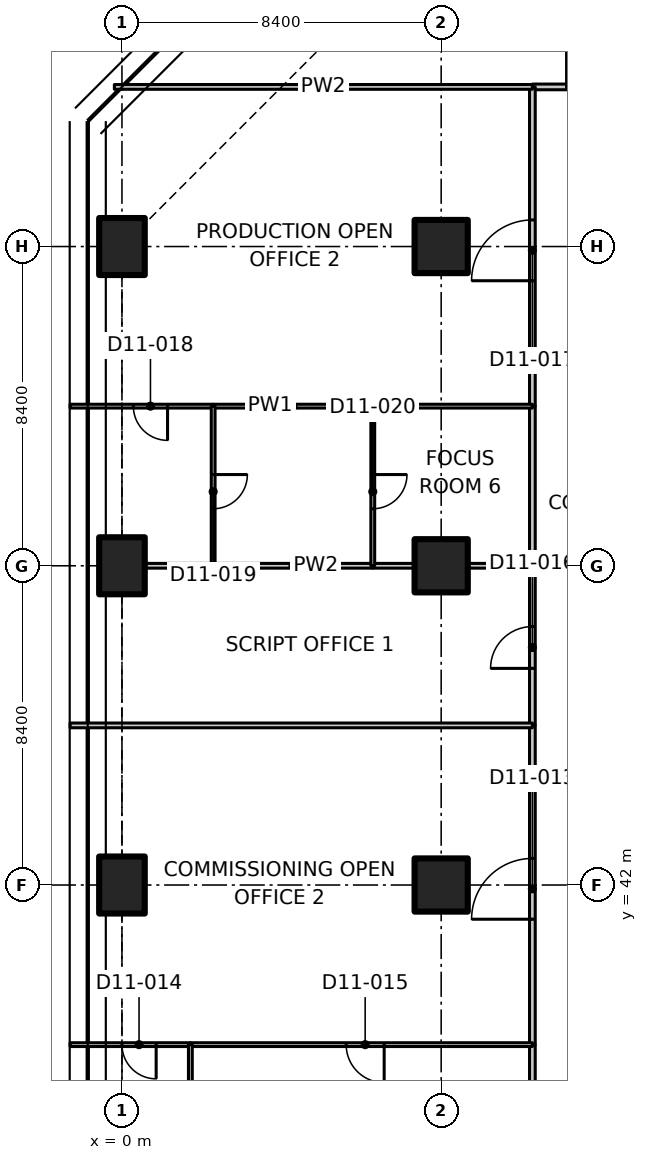
"""IFC4 building model, lengths in metres.
Left out: names, types, materials, properties, quantities, classifications, styles, units other than length and angle.
Written with IfcOpenShell. Run it as: python <this file> out.ifc"""

import sys

from ifc_helpers import new_model, si_unit, direction, frame, frame_2d, origin, origin_2d, place, context, subcontext, project, spatial, polyline, rectangle, outline, extrude, element, fill, save


model = new_model("IFC4")
c1 = context("Model", 3, precision=1e-05, world=origin(), true_north=direction((0.0, 1.0)))
c2 = subcontext(c1, "Body", "Model", "MODEL_VIEW")
j1 = project(units=[si_unit("LENGTHUNIT", "METRE"), si_unit("PLANEANGLEUNIT", "RADIAN")], contexts=[c1])
p1 = place(None, origin())
s1 = spatial("IfcSite", under=j1, at=p1, CompositionType="ELEMENT")
p2 = place(p1, origin())
s2 = spatial("IfcBuilding", under=s1, at=p2, CompositionType="ELEMENT")
p3 = place(p2, frame((0.0, 0.0, 83.3)))
s3 = spatial("IfcBuildingStorey", under=s2, at=p3, CompositionType="ELEMENT", Elevation=83.3)
for number, where, z_axis, x_axis in (
    (1, (0.0, 42.0, 0.0), (0.0, 0.0, 1.0), (1.0, 0.0, 0.0)),
    (2, (0.0, 50.4, 0.0), (0.0, 0.0, 1.0), (1.0, 0.0, 0.0)),
    (3, (0.0, 58.8, 0.0), (0.0, 0.0, 1.0), (1.0, 0.0, 0.0)),
):
    element("IfcColumn", number, at=place(p3, frame(where, z_axis=z_axis, x_axis=x_axis)), inside=s3, PredefinedType="COLUMN", context=c2, shape_type="SweptSolid", body=[
        extrude(rectangle(XDim=1.2, YDim=1.5, at=origin_2d()), origin(), (0.0, 0.0, 1.0), 3.3),
    ])
for number, where, z_axis, x_axis in (
    (4, (8.4, 42.0, 0.0), (0.0, 0.0, 1.0), (1.0, 0.0, 0.0)),
    (5, (8.4, 50.4, 0.0), (0.0, 0.0, 1.0), (1.0, 0.0, 0.0)),
    (6, (8.4, 58.8, 0.0), (0.0, 0.0, 1.0), (1.0, 0.0, 0.0)),
):
    element("IfcColumn", number, at=place(p3, frame(where, z_axis=z_axis, x_axis=x_axis)), inside=s3, PredefinedType="COLUMN", context=c2, shape_type="SweptSolid", body=[
        extrude(rectangle(XDim=1.4, YDim=1.4, at=origin_2d()), origin(), (0.0, 0.0, 1.0), 3.3),
    ])
p4 = place(p3, frame((10.8, 63.0, 0.0), z_axis=(0.0, 0.0, 1.0), x_axis=(1.0, 0.0, 0.0)))
e7 = element("IfcWall", 7, at=p4, inside=s3, PredefinedType="PARTITIONING", context=c2, shape_type="SweptSolid", body=[
    extrude(rectangle(XDim=3.6, YDim=0.15, at=frame_2d((1.8, 0.0))), origin(), (0.0, 0.0, 1.0), 3.28),
])
p5 = place(p4, frame((0.9, 0.0, 0.0)))
e8 = element("IfcOpeningElement", 8, at=p5, cuts=e7, PredefinedType="OPENING", context=c2, shape_type="SweptSolid", body=[
    extrude(rectangle(XDim=2.0, YDim=2.4, at=frame_2d((1.0, 1.2))), frame((0.0, 0.085, 0.0), z_axis=(0.0, -1.0, 0.0), x_axis=(1.0, 0.0, 0.0)), (0.0, 0.0, 1.0), 0.17),
])
p6 = place(p3, frame((10.8, 37.8, 0.0), z_axis=(0.0, 0.0, 1.0), x_axis=(0.0, 1.0, 0.0)))
e9 = element("IfcWall", 9, at=p6, inside=s3, PredefinedType="PARTITIONING", context=c2, shape_type="SweptSolid", body=[
    extrude(rectangle(XDim=8.4, YDim=0.15, at=frame_2d((4.2, 0.0))), origin(), (0.0, 0.0, 1.0), 3.28),
])
p7 = place(p6, frame((3.3, 0.0, 0.0)))
e10 = element("IfcOpeningElement", 10, at=p7, cuts=e9, PredefinedType="OPENING", context=c2, shape_type="SweptSolid", body=[
    extrude(rectangle(XDim=1.6, YDim=2.1, at=frame_2d((0.8, 1.05))), frame((0.0, 0.085, 0.0), z_axis=(0.0, -1.0, 0.0), x_axis=(1.0, 0.0, 0.0)), (0.0, 0.0, 1.0), 0.17),
])
p8 = place(p3, frame((10.8, 33.6, 0.0), z_axis=(0.0, 0.0, 1.0), x_axis=(0.0, 1.0, 0.0)))
e11 = element("IfcWall", 11, at=p8, inside=s3, PredefinedType="PARTITIONING", context=c2, shape_type="SweptSolid", body=[
    extrude(rectangle(XDim=4.2, YDim=0.15, at=frame_2d((2.1, 0.0))), origin(), (0.0, 0.0, 1.0), 3.28),
])
p9 = place(p3, frame((10.8, 46.2, 0.0), z_axis=(0.0, 0.0, 1.0), x_axis=(0.0, 1.0, 0.0)))
e12 = element("IfcWall", 12, at=p9, inside=s3, PredefinedType="PARTITIONING", context=c2, shape_type="SweptSolid", body=[
    extrude(rectangle(XDim=4.2, YDim=0.15, at=frame_2d((2.1, 0.0))), origin(), (0.0, 0.0, 1.0), 3.28),
])
p10 = place(p9, frame((1.5, 0.0, 0.0)))
e13 = element("IfcOpeningElement", 13, at=p10, cuts=e12, PredefinedType="OPENING", context=c2, shape_type="SweptSolid", body=[
    extrude(rectangle(XDim=1.1, YDim=2.1, at=frame_2d((0.55, 1.05))), frame((0.0, 0.085, 0.0), z_axis=(0.0, -1.0, 0.0), x_axis=(1.0, 0.0, 0.0)), (0.0, 0.0, 1.0), 0.17),
])
p11 = place(p3, frame((10.8, 54.6, 0.0), z_axis=(0.0, 0.0, 1.0), x_axis=(0.0, 1.0, 0.0)))
e14 = element("IfcWall", 14, at=p11, inside=s3, PredefinedType="PARTITIONING", context=c2, shape_type="SweptSolid", body=[
    extrude(rectangle(XDim=8.4, YDim=0.15, at=frame_2d((4.2, 0.0))), origin(), (0.0, 0.0, 1.0), 3.28),
])
p12 = place(p11, frame((3.3, 0.0, 0.0)))
e15 = element("IfcOpeningElement", 15, at=p12, cuts=e14, PredefinedType="OPENING", context=c2, shape_type="SweptSolid", body=[
    extrude(rectangle(XDim=1.6, YDim=2.1, at=frame_2d((0.8, 1.05))), frame((0.0, 0.085, 0.0), z_axis=(0.0, -1.0, 0.0), x_axis=(1.0, 0.0, 0.0)), (0.0, 0.0, 1.0), 0.17),
])
p13 = place(p3, frame((10.8, 50.4, 0.0), z_axis=(0.0, 0.0, 1.0), x_axis=(0.0, 1.0, 0.0)))
e16 = element("IfcWall", 16, at=p13, inside=s3, PredefinedType="PARTITIONING", context=c2, shape_type="SweptSolid", body=[
    extrude(rectangle(XDim=4.2, YDim=0.15, at=frame_2d((2.1, 0.0))), origin(), (0.0, 0.0, 1.0), 3.28),
])
p14 = place(p3, frame((10.8, 63.0, 0.0), z_axis=(0.0, 0.0, 1.0), x_axis=(-1.0, 0.0, 0.0)))
e17 = element("IfcWall", 17, at=p14, inside=s3, PredefinedType="PARTITIONING", context=c2, shape_type="SweptSolid", body=[
    extrude(outline(polyline([(0.0, 0.0), (11.0, 0.0), (11.0, 3.28), (7.278, 3.28), (7.276, 2.93), (5.924, 2.93), (5.922, 3.28), (0.0, 3.28), (0.0, 0.0)])), frame((0.0, 0.062, 0.0), z_axis=(0.0, -1.0, 0.0), x_axis=(1.0, 0.0, 0.0)), (0.0, 0.0, 1.0), 0.125),
])
p15 = place(p3, frame((1.8, 37.8, 0.0), z_axis=(0.0, 0.0, 1.0), x_axis=(-1.0, 0.0, 0.0)))
e18 = element("IfcWall", 18, at=p15, inside=s3, PredefinedType="PARTITIONING", context=c2, shape_type="SweptSolid", body=[
    extrude(rectangle(XDim=3.165, YDim=0.1, at=frame_2d((1.583, 0.0))), origin(), (0.0, 0.0, 1.0), 2.93),
])
p16 = place(p15, frame((0.9, 0.0, 0.0)))
e19 = element("IfcOpeningElement", 19, at=p16, cuts=e18, PredefinedType="OPENING", context=c2, shape_type="SweptSolid", body=[
    extrude(rectangle(XDim=0.9, YDim=2.1, at=frame_2d((0.45, 1.05))), frame((0.0, 0.06, 0.0), z_axis=(0.0, -1.0, 0.0), x_axis=(1.0, 0.0, 0.0)), (0.0, 0.0, 1.0), 0.12),
])
p17 = place(p3, frame((10.8, 37.8, 0.0), z_axis=(0.0, 0.0, 1.0), x_axis=(-1.0, 0.0, 0.0)))
e20 = element("IfcWall", 20, at=p17, inside=s3, PredefinedType="PARTITIONING", context=c2, shape_type="SweptSolid", body=[
    extrude(rectangle(XDim=9.0, YDim=0.1, at=frame_2d((4.5, 0.0))), origin(), (0.0, 0.0, 1.0), 3.28),
])
p18 = place(p17, frame((3.9, 0.0, 0.0)))
e21 = element("IfcOpeningElement", 21, at=p18, cuts=e20, PredefinedType="OPENING", context=c2, shape_type="SweptSolid", body=[
    extrude(rectangle(XDim=1.0, YDim=2.1, at=frame_2d((0.5, 1.05))), frame((0.0, 0.06, 0.0), z_axis=(0.0, -1.0, 0.0), x_axis=(1.0, 0.0, 0.0)), (0.0, 0.0, 1.0), 0.12),
])
p19 = place(p3, frame((-1.365, 46.2, 0.0), z_axis=(0.0, 0.0, 1.0), x_axis=(1.0, 0.0, 0.0)))
e22 = element("IfcWall", 22, at=p19, inside=s3, PredefinedType="PARTITIONING", context=c2, shape_type="SweptSolid", body=[
    extrude(outline(polyline([(0.0, 0.0), (12.165, 0.0), (12.165, 3.28), (1.815, 3.28), (1.813, 2.93), (0.917, 2.93), (0.915, 3.28), (0.265, 3.28), (0.0, 3.28), (0.0, 0.0)])), frame((0.0, 0.062, 0.0), z_axis=(0.0, -1.0, 0.0), x_axis=(1.0, 0.0, 0.0)), (0.0, 0.0, 1.0), 0.125),
])
p20 = place(p3, frame((1.8, 37.8, 0.0), z_axis=(0.0, 0.0, 1.0), x_axis=(0.0, -1.0, 0.0)))
e23 = element("IfcWall", 23, at=p20, inside=s3, PredefinedType="PARTITIONING", context=c2, shape_type="SweptSolid", body=[
    extrude(rectangle(XDim=4.2, YDim=0.1, at=frame_2d((2.1, 0.0))), origin(), (0.0, 0.0, 1.0), 3.28),
])
p21 = place(p3, frame((0.62, 50.4, 0.0), z_axis=(0.0, 0.0, 1.0), x_axis=(1.0, 0.0, 0.0)))
e24 = element("IfcWall", 24, at=p21, inside=s3, PredefinedType="PARTITIONING", context=c2, shape_type="SweptSolid", body=[
    extrude(rectangle(XDim=1.78, YDim=0.125, at=frame_2d((0.89, 0.0))), origin(), (0.0, 0.0, 1.0), 3.28),
])
p22 = place(p3, frame((2.4, 50.4, 0.0), z_axis=(0.0, 0.0, 1.0), x_axis=(1.0, 0.0, 0.0)))
e25 = element("IfcWall", 25, at=p22, inside=s3, PredefinedType="PARTITIONING", context=c2, shape_type="SweptSolid", body=[
    extrude(rectangle(XDim=4.2, YDim=0.125, at=frame_2d((2.1, 0.0))), origin(), (0.0, 0.0, 1.0), 3.28),
])
p23 = place(p3, frame((6.6, 50.4, 0.0), z_axis=(0.0, 0.0, 1.0), x_axis=(1.0, 0.0, 0.0)))
e26 = element("IfcWall", 26, at=p23, inside=s3, PredefinedType="PARTITIONING", context=c2, shape_type="SweptSolid", body=[
    extrude(rectangle(XDim=1.08, YDim=0.125, at=frame_2d((0.54, 0.0))), origin(), (0.0, 0.0, 1.0), 3.28),
])
p24 = place(p3, frame((9.12, 50.4, 0.0), z_axis=(0.0, 0.0, 1.0), x_axis=(1.0, 0.0, 0.0)))
e27 = element("IfcWall", 27, at=p24, inside=s3, PredefinedType="PARTITIONING", context=c2, shape_type="SweptSolid", body=[
    extrude(rectangle(XDim=1.68, YDim=0.125, at=frame_2d((0.84, 0.0))), origin(), (0.0, 0.0, 1.0), 3.28),
])
p25 = place(p3, frame((2.4, 54.6, 0.0), z_axis=(0.0, 0.0, 1.0), x_axis=(-1.0, 0.0, 0.0)))
e28 = element("IfcWall", 28, at=p25, inside=s3, PredefinedType="PARTITIONING", context=c2, shape_type="SweptSolid", body=[
    extrude(rectangle(XDim=3.765, YDim=0.1, at=frame_2d((1.882, 0.0))), origin(), (0.0, 0.0, 1.0), 2.93),
])
p26 = place(p25, frame((1.2, 0.0, 0.0)))
e29 = element("IfcOpeningElement", 29, at=p26, cuts=e28, PredefinedType="OPENING", context=c2, shape_type="SweptSolid", body=[
    extrude(rectangle(XDim=0.9, YDim=2.1, at=frame_2d((0.45, 1.05))), frame((0.0, 0.06, 0.0), z_axis=(0.0, -1.0, 0.0), x_axis=(1.0, 0.0, 0.0)), (0.0, 0.0, 1.0), 0.12),
])
p27 = place(p3, frame((6.6, 54.6, 0.0), z_axis=(0.0, 0.0, 1.0), x_axis=(-1.0, 0.0, 0.0)))
e30 = element("IfcWall", 30, at=p27, inside=s3, PredefinedType="PARTITIONING", context=c2, shape_type="SweptSolid", body=[
    extrude(rectangle(XDim=4.2, YDim=0.1, at=frame_2d((2.1, 0.0))), origin(), (0.0, 0.0, 1.0), 3.28),
])
p28 = place(p3, frame((10.8, 54.6, 0.0), z_axis=(0.0, 0.0, 1.0), x_axis=(-1.0, 0.0, 0.0)))
e31 = element("IfcWall", 31, at=p28, inside=s3, PredefinedType="PARTITIONING", context=c2, shape_type="SweptSolid", body=[
    extrude(rectangle(XDim=4.2, YDim=0.1, at=frame_2d((2.1, 0.0))), origin(), (0.0, 0.0, 1.0), 3.28),
])
p29 = place(p3, frame((2.4, 54.6, 0.0), z_axis=(0.0, 0.0, 1.0), x_axis=(0.0, -1.0, 0.0)))
e32 = element("IfcWall", 32, at=p29, inside=s3, PredefinedType="PARTITIONING", context=c2, shape_type="SweptSolid", body=[
    extrude(rectangle(XDim=4.2, YDim=0.1, at=frame_2d((2.1, 0.0))), origin(), (0.0, 0.0, 1.0), 3.28),
])
p30 = place(p29, frame((1.8, 0.0, 0.0)))
e33 = element("IfcOpeningElement", 33, at=p30, cuts=e32, PredefinedType="OPENING", context=c2, shape_type="SweptSolid", body=[
    extrude(rectangle(XDim=0.9, YDim=2.1, at=frame_2d((0.45, 1.05))), frame((0.0, 0.06, 0.0), z_axis=(0.0, -1.0, 0.0), x_axis=(1.0, 0.0, 0.0)), (0.0, 0.0, 1.0), 0.12),
])
p31 = place(p3, frame((6.6, 54.6, 0.0), z_axis=(0.0, 0.0, 1.0), x_axis=(0.0, -1.0, 0.0)))
e34 = element("IfcWall", 34, at=p31, inside=s3, PredefinedType="PARTITIONING", context=c2, shape_type="SweptSolid", body=[
    extrude(rectangle(XDim=4.2, YDim=0.1, at=frame_2d((2.1, 0.0))), origin(), (0.0, 0.0, 1.0), 3.28),
])
p32 = place(p31, frame((1.8, 0.0, 0.0)))
e35 = element("IfcOpeningElement", 35, at=p32, cuts=e34, PredefinedType="OPENING", context=c2, shape_type="SweptSolid", body=[
    extrude(rectangle(XDim=0.9, YDim=2.1, at=frame_2d((0.45, 1.05))), frame((0.0, 0.06, 0.0), z_axis=(0.0, -1.0, 0.0), x_axis=(1.0, 0.0, 0.0)), (0.0, 0.0, 1.0), 0.12),
])
p33 = place(p5, origin())
e36 = element("IfcDoor", 36, at=p33, inside=s3, OperationType="DOUBLE_DOOR_SINGLE_SWING", PredefinedType="DOOR", context=c2, shape_type="SweptSolid", body=[
    extrude(rectangle(XDim=2.0, YDim=2.4, at=frame_2d((1.0, 1.2))), frame((0.0, 0.025, 0.0), z_axis=(0.0, -1.0, 0.0), x_axis=(1.0, 0.0, 0.0)), (0.0, 0.0, 1.0), 0.05),
])
fill(e8, e36)
p34 = place(p7, origin())
e37 = element("IfcDoor", 37, at=p34, inside=s3, OperationType="DOUBLE_DOOR_SINGLE_SWING", PredefinedType="DOOR", context=c2, shape_type="SweptSolid", body=[
    extrude(rectangle(XDim=1.6, YDim=2.1, at=frame_2d((0.8, 1.05))), frame((0.0, 0.025, 0.0), z_axis=(0.0, -1.0, 0.0), x_axis=(1.0, 0.0, 0.0)), (0.0, 0.0, 1.0), 0.05),
])
fill(e10, e37)
p35 = place(p16, origin())
e38 = element("IfcDoor", 38, at=p35, inside=s3, OperationType="SINGLE_SWING_LEFT", PredefinedType="DOOR", context=c2, shape_type="SweptSolid", body=[
    extrude(rectangle(XDim=0.9, YDim=2.1, at=frame_2d((0.45, 1.05))), frame((0.0, 0.025, 0.0), z_axis=(0.0, -1.0, 0.0), x_axis=(1.0, 0.0, 0.0)), (0.0, 0.0, 1.0), 0.05),
])
fill(e19, e38)
p36 = place(p18, origin())
e39 = element("IfcDoor", 39, at=p36, inside=s3, OperationType="SINGLE_SWING_LEFT", PredefinedType="DOOR", context=c2, shape_type="SweptSolid", body=[
    extrude(rectangle(XDim=1.0, YDim=2.1, at=frame_2d((0.5, 1.05))), frame((0.0, 0.025, 0.0), z_axis=(0.0, -1.0, 0.0), x_axis=(1.0, 0.0, 0.0)), (0.0, 0.0, 1.0), 0.05),
])
fill(e21, e39)
p37 = place(p10, origin())
e40 = element("IfcDoor", 40, at=p37, inside=s3, OperationType="SINGLE_SWING_LEFT", PredefinedType="DOOR", context=c2, shape_type="SweptSolid", body=[
    extrude(rectangle(XDim=1.1, YDim=2.1, at=frame_2d((0.55, 1.05))), frame((0.0, 0.025, 0.0), z_axis=(0.0, -1.0, 0.0), x_axis=(1.0, 0.0, 0.0)), (0.0, 0.0, 1.0), 0.05),
])
fill(e13, e40)
p38 = place(p12, origin())
e41 = element("IfcDoor", 41, at=p38, inside=s3, OperationType="DOUBLE_DOOR_SINGLE_SWING", PredefinedType="DOOR", context=c2, shape_type="SweptSolid", body=[
    extrude(rectangle(XDim=1.6, YDim=2.1, at=frame_2d((0.8, 1.05))), frame((0.0, 0.025, 0.0), z_axis=(0.0, -1.0, 0.0), x_axis=(1.0, 0.0, 0.0)), (0.0, 0.0, 1.0), 0.05),
])
fill(e15, e41)
p39 = place(p26, origin())
e42 = element("IfcDoor", 42, at=p39, inside=s3, OperationType="SINGLE_SWING_LEFT", PredefinedType="DOOR", context=c2, shape_type="SweptSolid", body=[
    extrude(rectangle(XDim=0.9, YDim=2.1, at=frame_2d((0.45, 1.05))), frame((0.0, 0.025, 0.0), z_axis=(0.0, -1.0, 0.0), x_axis=(1.0, 0.0, 0.0)), (0.0, 0.0, 1.0), 0.05),
])
fill(e29, e42)
p40 = place(p30, origin())
e43 = element("IfcDoor", 43, at=p40, inside=s3, OperationType="SINGLE_SWING_LEFT", PredefinedType="DOOR", context=c2, shape_type="SweptSolid", body=[
    extrude(rectangle(XDim=0.9, YDim=2.1, at=frame_2d((0.45, 1.05))), frame((0.0, 0.025, 0.0), z_axis=(0.0, -1.0, 0.0), x_axis=(1.0, 0.0, 0.0)), (0.0, 0.0, 1.0), 0.05),
])
fill(e33, e43)
p41 = place(p32, origin())
e44 = element("IfcDoor", 44, at=p41, inside=s3, OperationType="SINGLE_SWING_LEFT", PredefinedType="DOOR", context=c2, shape_type="SweptSolid", body=[
    extrude(rectangle(XDim=0.9, YDim=2.1, at=frame_2d((0.45, 1.05))), frame((0.0, 0.025, 0.0), z_axis=(0.0, -1.0, 0.0), x_axis=(1.0, 0.0, 0.0)), (0.0, 0.0, 1.0), 0.05),
])
fill(e35, e44)
save(model, sys.argv[1])
